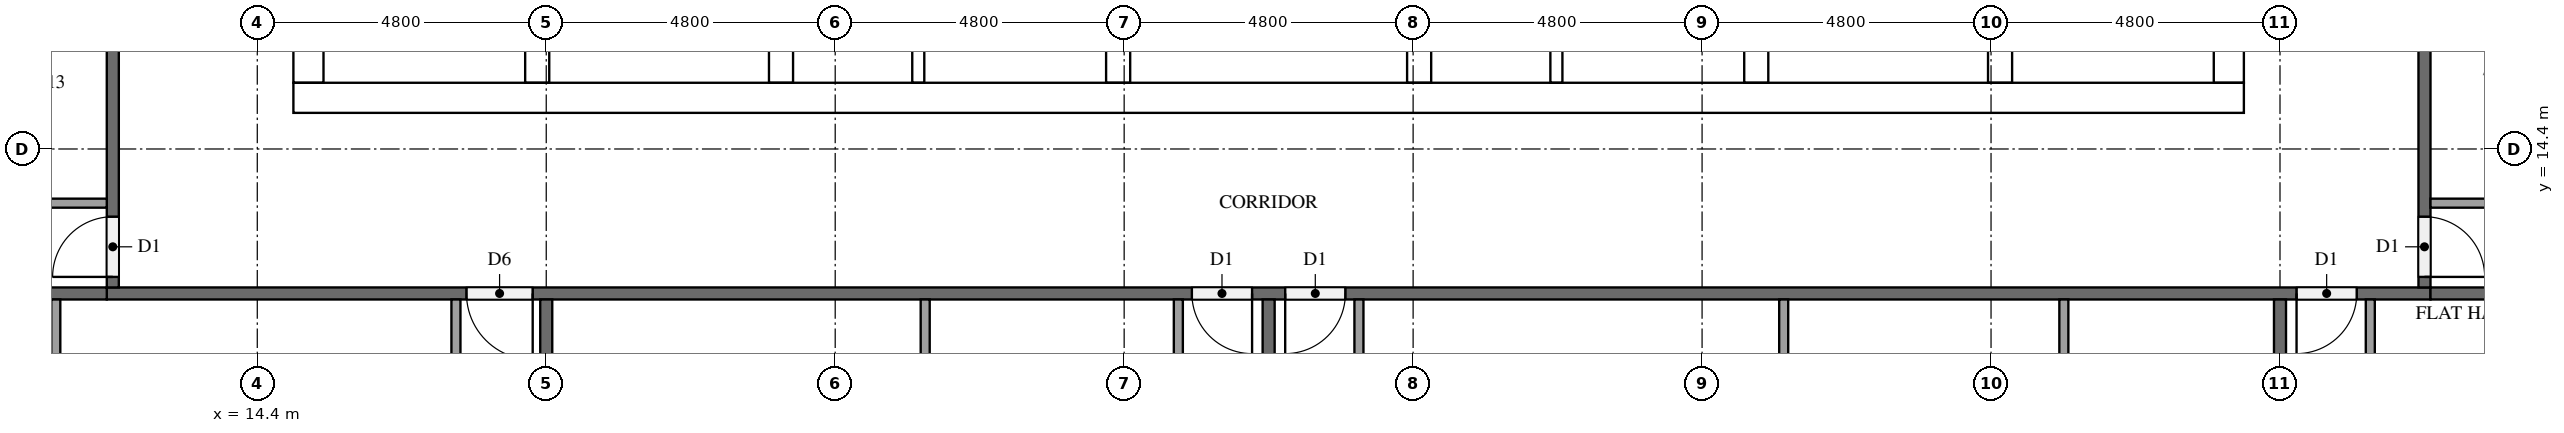
"""IFC4 building model, lengths in metres.
Left out: names, types, materials, properties, quantities, classifications, styles, units other than length and angle.
Written with IfcOpenShell. Run it as: python <this file> out.ifc"""

import sys

from ifc_helpers import new_model, si_unit, direction, frame, frame_2d, origin, place, context, subcontext, project, spatial, rectangle, extrude, element, fill, save


model = new_model("IFC4")
c1 = context("Model", 3, precision=1e-05, world=origin(), true_north=direction((0.0, 1.0)))
c2 = subcontext(c1, "Body", "Model", "MODEL_VIEW")
j1 = project(units=[si_unit("LENGTHUNIT", "METRE"), si_unit("PLANEANGLEUNIT", "RADIAN")], contexts=[c1])
p1 = place(None, origin())
s1 = spatial("IfcSite", under=j1, at=p1, CompositionType="ELEMENT")
p2 = place(p1, origin())
s2 = spatial("IfcBuilding", under=s1, at=p2, CompositionType="ELEMENT")
p3 = place(p2, frame((0.0, 0.0, 268.6)))
s3 = spatial("IfcBuildingStorey", under=s2, at=p3, CompositionType="ELEMENT", Elevation=268.6)
p4 = place(p3, frame((15.0, 15.25, 0.0), z_axis=(0.0, 0.0, 1.0), x_axis=(1.0, 0.0, 0.0)))
e1 = element("IfcWall", 1, at=p4, inside=s3, PredefinedType="SHEAR", context=c2, shape_type="SweptSolid", body=[
    extrude(rectangle(XDim=32.4, YDim=0.5, at=frame_2d((16.2, 0.0))), origin(), (0.0, 0.0, 1.0), 3.2),
])
p5 = place(p4, frame((15.3, 0.0, 0.0)))
e2 = element("IfcOpeningElement", 2, at=p5, cuts=e1, PredefinedType="OPENING", context=c2, shape_type="SweptSolid", body=[
    extrude(rectangle(XDim=1.8, YDim=2.1, at=frame_2d((0.9, 1.05))), frame((0.0, 0.26, 0.0), z_axis=(0.0, -1.0, 0.0), x_axis=(1.0, 0.0, 0.0)), (0.0, 0.0, 1.0), 0.52),
])
p6 = place(p3, frame((15.25, 15.5, 0.0), z_axis=(0.0, 0.0, 1.0), x_axis=(0.0, 1.0, 0.0)))
e3 = element("IfcWall", 3, at=p6, inside=s3, PredefinedType="SHEAR", context=c2, shape_type="SweptSolid", body=[
    extrude(rectangle(XDim=21.8, YDim=0.5, at=frame_2d((10.9, 0.0))), origin(), (0.0, 0.0, 1.0), 3.2),
])
p7 = place(p6, frame((5.26, 0.0, 0.0)))
e4 = element("IfcOpeningElement", 4, at=p7, cuts=e3, PredefinedType="OPENING", context=c2, shape_type="SweptSolid", body=[
    extrude(rectangle(XDim=1.2, YDim=2.1, at=frame_2d((0.6, 1.05))), frame((0.0, 0.26, 0.0), z_axis=(0.0, -1.0, 0.0), x_axis=(1.0, 0.0, 0.0)), (0.0, 0.0, 1.0), 0.52),
])
p8 = place(p3, frame((47.15, 15.5, 0.0), z_axis=(0.0, 0.0, 1.0), x_axis=(0.0, 1.0, 0.0)))
e5 = element("IfcWall", 5, at=p8, inside=s3, PredefinedType="SHEAR", context=c2, shape_type="SweptSolid", body=[
    extrude(rectangle(XDim=21.8, YDim=0.5, at=frame_2d((10.9, 0.0))), origin(), (0.0, 0.0, 1.0), 3.2),
])
p9 = place(p8, frame((10.6, 0.0, 0.0)))
e6 = element("IfcOpeningElement", 6, at=p9, cuts=e5, PredefinedType="OPENING", context=c2, shape_type="SweptSolid", body=[
    extrude(rectangle(XDim=1.2, YDim=2.1, at=frame_2d((0.6, 1.05))), frame((0.0, 0.26, 0.0), z_axis=(0.0, -1.0, 0.0), x_axis=(1.0, 0.0, 0.0)), (0.0, 0.0, 1.0), 0.52),
])
p10 = place(p3, frame((19.05, 15.5, 0.0), z_axis=(0.0, 0.0, 1.0), x_axis=(0.0, 1.0, 0.0)))
e7 = element("IfcWall", 7, at=p10, inside=s3, PredefinedType="SHEAR", context=c2, shape_type="SweptSolid", body=[
    extrude(rectangle(XDim=15.55, YDim=0.4, at=frame_2d((7.775, 0.0))), origin(), (0.0, 0.0, 1.0), 3.2),
])
p11 = place(p10, frame((9.95, 0.0, 0.0)))
e8 = element("IfcOpeningElement", 8, at=p11, cuts=e7, PredefinedType="OPENING", context=c2, shape_type="SweptSolid", body=[
    extrude(rectangle(XDim=1.1, YDim=2.1, at=frame_2d((0.55, 1.05))), frame((0.0, 0.21, 0.0), z_axis=(0.0, -1.0, 0.0), x_axis=(1.0, 0.0, 0.0)), (0.0, 0.0, 1.0), 0.42),
])
p12 = place(p10, frame((13.45, 0.0, 0.0)))
e9 = element("IfcOpeningElement", 9, at=p12, cuts=e7, PredefinedType="OPENING", context=c2, shape_type="SweptSolid", body=[
    extrude(rectangle(XDim=1.1, YDim=2.1, at=frame_2d((0.55, 1.05))), frame((0.0, 0.21, 0.0), z_axis=(0.0, -1.0, 0.0), x_axis=(1.0, 0.0, 0.0)), (0.0, 0.0, 1.0), 0.42),
])
p13 = place(p10, frame((0.7, 0.0, 0.0)))
e10 = element("IfcOpeningElement", 10, at=p13, cuts=e7, PredefinedType="OPENING", context=c2, shape_type="SweptSolid", body=[
    extrude(rectangle(XDim=1.2, YDim=2.1, at=frame_2d((0.6, 1.05))), frame((0.0, 0.21, 0.0), z_axis=(0.0, -1.0, 0.0), x_axis=(1.0, 0.0, 0.0)), (0.0, 0.0, 1.0), 0.42),
])
p14 = place(p3, frame((23.1, 15.5, 0.0), z_axis=(0.0, 0.0, 1.0), x_axis=(0.0, 1.0, 0.0)))
e11 = element("IfcWall", 11, at=p14, inside=s3, PredefinedType="SHEAR", context=c2, shape_type="SweptSolid", body=[
    extrude(rectangle(XDim=21.8, YDim=0.4, at=frame_2d((10.9, 0.0))), origin(), (0.0, 0.0, 1.0), 3.2),
])
p15 = place(p3, frame((39.3, 15.5, 0.0), z_axis=(0.0, 0.0, 1.0), x_axis=(0.0, 1.0, 0.0)))
e12 = element("IfcWall", 12, at=p15, inside=s3, PredefinedType="SHEAR", context=c2, shape_type="SweptSolid", body=[
    extrude(rectangle(XDim=8.75, YDim=0.4, at=frame_2d((4.375, 0.0))), origin(), (0.0, 0.0, 1.0), 3.2),
])
p16 = place(p3, frame((43.35, 15.5, 0.0), z_axis=(0.0, 0.0, 1.0), x_axis=(0.0, 1.0, 0.0)))
e13 = element("IfcWall", 13, at=p16, inside=s3, PredefinedType="SHEAR", context=c2, shape_type="SweptSolid", body=[
    extrude(rectangle(XDim=8.75, YDim=0.4, at=frame_2d((4.375, 0.0))), origin(), (0.0, 0.0, 1.0), 3.2),
])
p17 = place(p16, frame((0.7, 0.0, 0.0)))
e14 = element("IfcOpeningElement", 14, at=p17, cuts=e13, PredefinedType="OPENING", context=c2, shape_type="SweptSolid", body=[
    extrude(rectangle(XDim=1.2, YDim=2.1, at=frame_2d((0.6, 1.05))), frame((0.0, 0.21, 0.0), z_axis=(0.0, -1.0, 0.0), x_axis=(1.0, 0.0, 0.0)), (0.0, 0.0, 1.0), 0.42),
])
for number, where, z_axis, x_axis in (
    (15, (28.7, 15.5, 0.0), (0.0, 0.0, 1.0), (0.0, 1.0, 0.0)),
    (16, (33.7, 15.5, 0.0), (0.0, 0.0, 1.0), (0.0, 1.0, 0.0)),
):
    element("IfcWall", number, at=place(p3, frame(where, z_axis=z_axis, x_axis=x_axis)), inside=s3, PredefinedType="SHEAR", context=c2, shape_type="SweptSolid", body=[
        extrude(rectangle(XDim=3.05, YDim=0.4, at=frame_2d((1.525, 0.0))), origin(), (0.0, 0.0, 1.0), 3.2),
    ])
for number, where, z_axis, x_axis in (
    (17, (25.38, 15.5, 0.0), (0.0, 0.0, 1.0), (0.0, 1.0, 0.0)),
    (18, (35.98, 15.5, 0.0), (0.0, 0.0, 1.0), (0.0, 1.0, 0.0)),
):
    element("IfcWall", number, at=place(p3, frame(where, z_axis=z_axis, x_axis=x_axis)), inside=s3, PredefinedType="PARTITIONING", context=c2, shape_type="SweptSolid", body=[
        extrude(rectangle(XDim=3.05, YDim=0.2, at=frame_2d((1.525, 0.0))), origin(), (0.0, 0.0, 1.0), 3.2),
    ])
p18 = place(p3, frame((50.5, 12.0, 0.0), z_axis=(0.0, 0.0, 1.0), x_axis=(-1.0, 0.0, 0.0)))
e19 = element("IfcWall", 19, at=p18, inside=s3, PredefinedType="PARTITIONING", context=c2, shape_type="SweptSolid", body=[
    extrude(rectangle(XDim=38.6, YDim=0.2, at=frame_2d((19.3, 0.0))), origin(), (0.0, 0.0, 1.0), 3.2),
])
p19 = place(p18, frame((31.525, 0.0, 0.0)))
e20 = element("IfcOpeningElement", 20, at=p19, cuts=e19, PredefinedType="OPENING", context=c2, shape_type="SweptSolid", body=[
    extrude(rectangle(XDim=1.1, YDim=2.1, at=frame_2d((0.55, 1.05))), frame((0.0, 0.11, 0.0), z_axis=(0.0, -1.0, 0.0), x_axis=(1.0, 0.0, 0.0)), (0.0, 0.0, 1.0), 0.22),
])
p20 = place(p18, frame((19.575, 0.0, 0.0)))
e21 = element("IfcOpeningElement", 21, at=p20, cuts=e19, PredefinedType="OPENING", context=c2, shape_type="SweptSolid", body=[
    extrude(rectangle(XDim=1.0, YDim=2.1, at=frame_2d((0.5, 1.05))), frame((0.0, 0.11, 0.0), z_axis=(0.0, -1.0, 0.0), x_axis=(1.0, 0.0, 0.0)), (0.0, 0.0, 1.0), 0.22),
])
p21 = place(p18, frame((18.025, 0.0, 0.0)))
e22 = element("IfcOpeningElement", 22, at=p21, cuts=e19, PredefinedType="OPENING", context=c2, shape_type="SweptSolid", body=[
    extrude(rectangle(XDim=1.0, YDim=2.1, at=frame_2d((0.5, 1.05))), frame((0.0, 0.11, 0.0), z_axis=(0.0, -1.0, 0.0), x_axis=(1.0, 0.0, 0.0)), (0.0, 0.0, 1.0), 0.22),
])
p22 = place(p18, frame((1.225, 0.0, 0.0)))
e23 = element("IfcOpeningElement", 23, at=p22, cuts=e19, PredefinedType="OPENING", context=c2, shape_type="SweptSolid", body=[
    extrude(rectangle(XDim=1.0, YDim=2.1, at=frame_2d((0.5, 1.05))), frame((0.0, 0.11, 0.0), z_axis=(0.0, -1.0, 0.0), x_axis=(1.0, 0.0, 0.0)), (0.0, 0.0, 1.0), 0.22),
])
p23 = place(p3, frame((50.4, 40.7, 0.0), z_axis=(0.0, 0.0, 1.0), x_axis=(0.0, -1.0, 0.0)))
e24 = element("IfcWall", 24, at=p23, inside=s3, PredefinedType="PARTITIONING", context=c2, shape_type="SweptSolid", body=[
    extrude(rectangle(XDim=28.6, YDim=0.2, at=frame_2d((14.3, 0.0))), origin(), (0.0, 0.0, 1.0), 3.2),
])
p24 = place(p23, frame((27.425, 0.0, 0.0)))
e25 = element("IfcOpeningElement", 25, at=p24, cuts=e24, PredefinedType="OPENING", context=c2, shape_type="SweptSolid", body=[
    extrude(rectangle(XDim=1.0, YDim=2.1, at=frame_2d((0.5, 1.05))), frame((0.0, 0.11, 0.0), z_axis=(0.0, -1.0, 0.0), x_axis=(1.0, 0.0, 0.0)), (0.0, 0.0, 1.0), 0.22),
])
p25 = place(p23, frame((0.175, 0.0, 0.0)))
e26 = element("IfcOpeningElement", 26, at=p25, cuts=e24, PredefinedType="OPENING", context=c2, shape_type="SweptSolid", body=[
    extrude(rectangle(XDim=1.0, YDim=2.1, at=frame_2d((0.5, 1.05))), frame((0.0, 0.11, 0.0), z_axis=(0.0, -1.0, 0.0), x_axis=(1.0, 0.0, 0.0)), (0.0, 0.0, 1.0), 0.22),
])
p26 = place(p3, frame((12.0, 12.1, 0.0), z_axis=(0.0, 0.0, 1.0), x_axis=(0.0, 1.0, 0.0)))
e27 = element("IfcWall", 27, at=p26, inside=s3, PredefinedType="PARTITIONING", context=c2, shape_type="SweptSolid", body=[
    extrude(rectangle(XDim=28.6, YDim=0.2, at=frame_2d((14.3, 0.0))), origin(), (0.0, 0.0, 1.0), 3.2),
])
p27 = place(p26, frame((24.175, 0.0, 0.0)))
e28 = element("IfcOpeningElement", 28, at=p27, cuts=e27, PredefinedType="OPENING", context=c2, shape_type="SweptSolid", body=[
    extrude(rectangle(XDim=1.0, YDim=2.1, at=frame_2d((0.5, 1.05))), frame((0.0, 0.11, 0.0), z_axis=(0.0, -1.0, 0.0), x_axis=(1.0, 0.0, 0.0)), (0.0, 0.0, 1.0), 0.22),
])
p28 = place(p26, frame((14.575, 0.0, 0.0)))
e29 = element("IfcOpeningElement", 29, at=p28, cuts=e27, PredefinedType="OPENING", context=c2, shape_type="SweptSolid", body=[
    extrude(rectangle(XDim=1.0, YDim=2.1, at=frame_2d((0.5, 1.05))), frame((0.0, 0.11, 0.0), z_axis=(0.0, -1.0, 0.0), x_axis=(1.0, 0.0, 0.0)), (0.0, 0.0, 1.0), 0.22),
])
p29 = place(p26, frame((0.175, 0.0, 0.0)))
e30 = element("IfcOpeningElement", 30, at=p29, cuts=e27, PredefinedType="OPENING", context=c2, shape_type="SweptSolid", body=[
    extrude(rectangle(XDim=1.0, YDim=2.1, at=frame_2d((0.5, 1.05))), frame((0.0, 0.11, 0.0), z_axis=(0.0, -1.0, 0.0), x_axis=(1.0, 0.0, 0.0)), (0.0, 0.0, 1.0), 0.22),
])
for number, where, z_axis, x_axis in (
    (31, (19.2, 11.9, 0.0), (0.0, 0.0, 1.0), (0.0, -1.0, 0.0)),
    (32, (0.1, 12.0, 0.0), (0.0, 0.0, 1.0), (1.0, 0.0, 0.0)),
    (33, (31.2, 11.9, 0.0), (0.0, 0.0, 1.0), (0.0, -1.0, 0.0)),
    (34, (48.0, 11.9, 0.0), (0.0, 0.0, 1.0), (0.0, -1.0, 0.0)),
):
    element("IfcWall", number, at=place(p3, frame(where, z_axis=z_axis, x_axis=x_axis)), inside=s3, PredefinedType="PARTITIONING", context=c2, shape_type="SweptSolid", body=[
        extrude(rectangle(XDim=11.8, YDim=0.2, at=frame_2d((5.9, 0.0))), origin(), (0.0, 0.0, 1.0), 3.2),
    ])
p30 = place(p3, frame((50.5, 12.0, 0.0), z_axis=(0.0, 0.0, 1.0), x_axis=(1.0, 0.0, 0.0)))
e35 = element("IfcWall", 35, at=p30, inside=s3, PredefinedType="PARTITIONING", context=c2, shape_type="SweptSolid", body=[
    extrude(rectangle(XDim=7.0, YDim=0.2, at=frame_2d((3.5, 0.0))), origin(), (0.0, 0.0, 1.0), 3.2),
])
p31 = place(p3, frame((11.053, 11.9, 0.0), z_axis=(0.0, 0.0, 1.0), x_axis=(0.0, -1.0, 0.0)))
e36 = element("IfcWall", 36, at=p31, inside=s3, PredefinedType="PARTITIONING", context=c2, shape_type="SweptSolid", body=[
    extrude(rectangle(XDim=2.975, YDim=0.15, at=frame_2d((1.487, 0.0))), origin(), (0.0, 0.0, 1.0), 3.2),
])
p32 = place(p3, frame((17.7, 11.9, 0.0), z_axis=(0.0, 0.0, 1.0), x_axis=(0.0, -1.0, 0.0)))
e37 = element("IfcWall", 37, at=p32, inside=s3, PredefinedType="PARTITIONING", context=c2, shape_type="SweptSolid", body=[
    extrude(rectangle(XDim=3.125, YDim=0.15, at=frame_2d((1.562, 0.0))), origin(), (0.0, 0.0, 1.0), 3.2),
])
p33 = place(p3, frame((25.495, 11.9, 0.0), z_axis=(0.0, 0.0, 1.0), x_axis=(0.0, -1.0, 0.0)))
e38 = element("IfcWall", 38, at=p33, inside=s3, PredefinedType="PARTITIONING", context=c2, shape_type="SweptSolid", body=[
    extrude(rectangle(XDim=2.975, YDim=0.15, at=frame_2d((1.487, 0.0))), origin(), (0.0, 0.0, 1.0), 3.2),
])
p34 = place(p3, frame((29.7, 11.9, 0.0), z_axis=(0.0, 0.0, 1.0), x_axis=(0.0, -1.0, 0.0)))
e39 = element("IfcWall", 39, at=p34, inside=s3, PredefinedType="PARTITIONING", context=c2, shape_type="SweptSolid", body=[
    extrude(rectangle(XDim=3.125, YDim=0.15, at=frame_2d((1.562, 0.0))), origin(), (0.0, 0.0, 1.0), 3.2),
])
for number, where, z_axis, x_axis in (
    (40, (39.756, 11.9, 0.0), (0.0, 0.0, 1.0), (0.0, -1.0, 0.0)),
    (41, (44.41, 11.9, 0.0), (0.0, 0.0, 1.0), (0.0, -1.0, 0.0)),
):
    element("IfcWall", number, at=place(p3, frame(where, z_axis=z_axis, x_axis=x_axis)), inside=s3, PredefinedType="PARTITIONING", context=c2, shape_type="SweptSolid", body=[
        extrude(rectangle(XDim=3.725, YDim=0.15, at=frame_2d((1.862, 0.0))), origin(), (0.0, 0.0, 1.0), 3.2),
    ])
p35 = place(p3, frame((32.7, 11.9, 0.0), z_axis=(0.0, 0.0, 1.0), x_axis=(0.0, -1.0, 0.0)))
e42 = element("IfcWall", 42, at=p35, inside=s3, PredefinedType="PARTITIONING", context=c2, shape_type="SweptSolid", body=[
    extrude(rectangle(XDim=3.875, YDim=0.15, at=frame_2d((1.938, 0.0))), origin(), (0.0, 0.0, 1.0), 3.2),
])
p36 = place(p3, frame((49.5, 11.9, 0.0), z_axis=(0.0, 0.0, 1.0), x_axis=(0.0, -1.0, 0.0)))
e43 = element("IfcWall", 43, at=p36, inside=s3, PredefinedType="PARTITIONING", context=c2, shape_type="SweptSolid", body=[
    extrude(rectangle(XDim=3.125, YDim=0.15, at=frame_2d((1.562, 0.0))), origin(), (0.0, 0.0, 1.0), 3.2),
])
p37 = place(p3, frame((50.5, 13.5, 0.0), z_axis=(0.0, 0.0, 1.0), x_axis=(1.0, 0.0, 0.0)))
e44 = element("IfcWall", 44, at=p37, inside=s3, PredefinedType="PARTITIONING", context=c2, shape_type="SweptSolid", body=[
    extrude(rectangle(XDim=2.525, YDim=0.15, at=frame_2d((1.262, 0.0))), origin(), (0.0, 0.0, 1.0), 3.2),
])
p38 = place(p3, frame((11.9, 13.5, 0.0), z_axis=(0.0, 0.0, 1.0), x_axis=(-1.0, 0.0, 0.0)))
e45 = element("IfcWall", 45, at=p38, inside=s3, PredefinedType="PARTITIONING", context=c2, shape_type="SweptSolid", body=[
    extrude(rectangle(XDim=4.025, YDim=0.15, at=frame_2d((2.012, 0.0))), origin(), (0.0, 0.0, 1.0), 3.2),
])
p39 = place(p5, frame((1.8, 0.0, 0.0), z_axis=(0.0, 0.0, 1.0), x_axis=(-1.0, 0.0, 0.0)))
e46 = element("IfcDoor", 46, at=p39, inside=s3, OperationType="DOUBLE_DOOR_SINGLE_SWING", PredefinedType="DOOR", context=c2, shape_type="SweptSolid", body=[
    extrude(rectangle(XDim=1.8, YDim=2.1, at=frame_2d((0.9, 1.05))), frame((0.0, 0.025, 0.0), z_axis=(0.0, -1.0, 0.0), x_axis=(1.0, 0.0, 0.0)), (0.0, 0.0, 1.0), 0.05),
])
fill(e2, e46)
p40 = place(p19, origin())
e47 = element("IfcDoor", 47, at=p40, inside=s3, OperationType="SINGLE_SWING_LEFT", PredefinedType="DOOR", context=c2, shape_type="SweptSolid", body=[
    extrude(rectangle(XDim=1.1, YDim=2.1, at=frame_2d((0.55, 1.05))), frame((0.0, 0.025, 0.0), z_axis=(0.0, -1.0, 0.0), x_axis=(1.0, 0.0, 0.0)), (0.0, 0.0, 1.0), 0.05),
])
fill(e20, e47)
p41 = place(p20, origin())
e48 = element("IfcDoor", 48, at=p41, inside=s3, OperationType="SINGLE_SWING_LEFT", PredefinedType="DOOR", context=c2, shape_type="SweptSolid", body=[
    extrude(rectangle(XDim=1.0, YDim=2.1, at=frame_2d((0.5, 1.05))), frame((0.0, 0.025, 0.0), z_axis=(0.0, -1.0, 0.0), x_axis=(1.0, 0.0, 0.0)), (0.0, 0.0, 1.0), 0.05),
])
fill(e21, e48)
p42 = place(p21, origin())
e49 = element("IfcDoor", 49, at=p42, inside=s3, OperationType="SINGLE_SWING_RIGHT", PredefinedType="DOOR", context=c2, shape_type="SweptSolid", body=[
    extrude(rectangle(XDim=1.0, YDim=2.1, at=frame_2d((0.5, 1.05))), frame((0.0, 0.025, 0.0), z_axis=(0.0, -1.0, 0.0), x_axis=(1.0, 0.0, 0.0)), (0.0, 0.0, 1.0), 0.05),
])
fill(e22, e49)
p43 = place(p22, origin())
e50 = element("IfcDoor", 50, at=p43, inside=s3, OperationType="SINGLE_SWING_RIGHT", PredefinedType="DOOR", context=c2, shape_type="SweptSolid", body=[
    extrude(rectangle(XDim=1.0, YDim=2.1, at=frame_2d((0.5, 1.05))), frame((0.0, 0.025, 0.0), z_axis=(0.0, -1.0, 0.0), x_axis=(1.0, 0.0, 0.0)), (0.0, 0.0, 1.0), 0.05),
])
fill(e23, e50)
p44 = place(p24, origin())
e51 = element("IfcDoor", 51, at=p44, inside=s3, OperationType="SINGLE_SWING_RIGHT", PredefinedType="DOOR", context=c2, shape_type="SweptSolid", body=[
    extrude(rectangle(XDim=1.0, YDim=2.1, at=frame_2d((0.5, 1.05))), frame((0.0, 0.025, 0.0), z_axis=(0.0, -1.0, 0.0), x_axis=(1.0, 0.0, 0.0)), (0.0, 0.0, 1.0), 0.05),
])
fill(e25, e51)
p45 = place(p29, origin())
e52 = element("IfcDoor", 52, at=p45, inside=s3, OperationType="SINGLE_SWING_LEFT", PredefinedType="DOOR", context=c2, shape_type="SweptSolid", body=[
    extrude(rectangle(XDim=1.0, YDim=2.1, at=frame_2d((0.5, 1.05))), frame((0.0, 0.025, 0.0), z_axis=(0.0, -1.0, 0.0), x_axis=(1.0, 0.0, 0.0)), (0.0, 0.0, 1.0), 0.05),
])
fill(e30, e52)
save(model, sys.argv[1])
